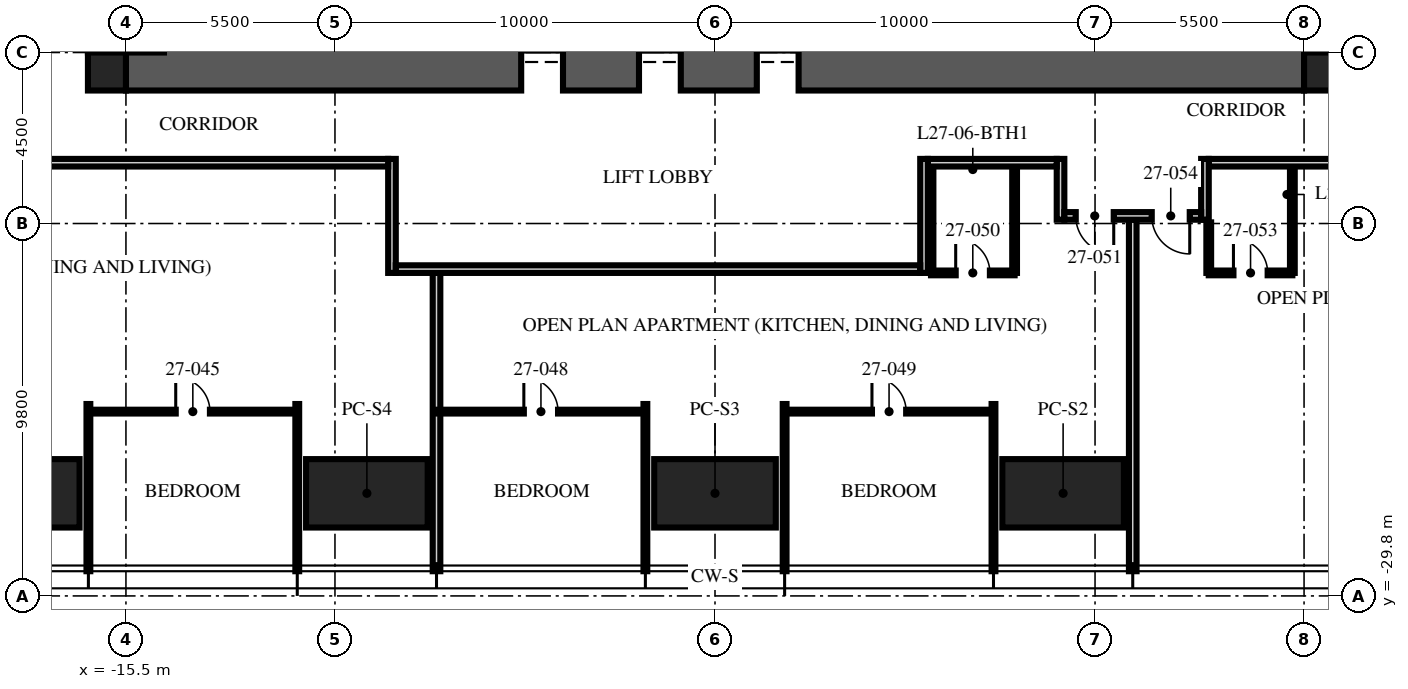
"""IFC4 building model, lengths in metres.
Left out: names, types, materials, properties, quantities, classifications, styles, units other than length and angle.
Written with IfcOpenShell. Run it as: python <this file> out.ifc"""

import sys

from ifc_helpers import new_model, si_unit, direction, frame, frame_2d, origin, origin_2d, place, context, subcontext, project, spatial, rectangle, hollow_rectangle, extrude, element, fill, save


model = new_model("IFC4")
c1 = context("Model", 3, precision=1e-05, world=origin(), true_north=direction((0.0, 1.0)))
c2 = subcontext(c1, "Body", "Model", "MODEL_VIEW")
j1 = project(units=[si_unit("LENGTHUNIT", "METRE"), si_unit("PLANEANGLEUNIT", "RADIAN")], contexts=[c1])
p1 = place(None, origin())
s1 = spatial("IfcSite", under=j1, at=p1, CompositionType="ELEMENT")
p2 = place(p1, origin())
s2 = spatial("IfcBuilding", under=s1, at=p2, CompositionType="ELEMENT")
p3 = place(p2, frame((0.0, 0.0, 111.0)))
s3 = spatial("IfcBuildingStorey", under=s2, at=p3, CompositionType="ELEMENT", Elevation=111.0)
p4 = place(p3, frame((-15.5, -15.5, -0.25), z_axis=(0.0, 0.0, 1.0), x_axis=(1.0, 0.0, 0.0)))
e1 = element("IfcWall", 1, at=p4, inside=s3, PredefinedType="SHEAR", context=c2, shape_type="SweptSolid", body=[
    extrude(rectangle(XDim=31.0, YDim=2.0, at=frame_2d((15.5, 0.0))), origin(), (0.0, 0.0, 1.0), 3.75),
])
p5 = place(p4, frame((10.4, 0.0, 0.25)))
e2 = element("IfcOpeningElement", 2, at=p5, cuts=e1, PredefinedType="OPENING", context=c2, shape_type="SweptSolid", body=[
    extrude(rectangle(XDim=1.1, YDim=2.1, at=frame_2d((0.55, 1.05))), frame((0.0, 1.01, 0.0), z_axis=(0.0, -1.0, 0.0), x_axis=(1.0, 0.0, 0.0)), (0.0, 0.0, 1.0), 2.02),
])
p6 = place(p4, frame((13.5, 0.0, 0.25)))
e3 = element("IfcOpeningElement", 3, at=p6, cuts=e1, PredefinedType="OPENING", context=c2, shape_type="SweptSolid", body=[
    extrude(rectangle(XDim=1.1, YDim=2.1, at=frame_2d((0.55, 1.05))), frame((0.0, 1.01, 0.0), z_axis=(0.0, -1.0, 0.0), x_axis=(1.0, 0.0, 0.0)), (0.0, 0.0, 1.0), 2.02),
])
p7 = place(p4, frame((16.6, 0.0, 0.25)))
e4 = element("IfcOpeningElement", 4, at=p7, cuts=e1, PredefinedType="OPENING", context=c2, shape_type="SweptSolid", body=[
    extrude(rectangle(XDim=1.1, YDim=2.1, at=frame_2d((0.55, 1.05))), frame((0.0, 1.01, 0.0), z_axis=(0.0, -1.0, 0.0), x_axis=(1.0, 0.0, 0.0)), (0.0, 0.0, 1.0), 2.02),
])
for number, where, z_axis, x_axis in (
    (5, (-16.0, -16.0, -0.25), (0.0, 0.0, 1.0), (1.0, 0.0, 0.0)),
    (6, (16.0, -16.0, -0.25), (0.0, 0.0, 1.0), (1.0, 0.0, 0.0)),
):
    element("IfcColumn", number, at=place(p3, frame(where, z_axis=z_axis, x_axis=x_axis)), inside=s3, PredefinedType="COLUMN", context=c2, shape_type="SweptSolid", body=[
        extrude(rectangle(XDim=1.0, YDim=1.0, at=origin_2d()), origin(), (0.0, 0.0, 1.0), 3.75),
    ])
for number, where, z_axis, x_axis in (
    (7, (9.16, -27.1, 0.0), (0.0, 0.0, 1.0), (1.0, 0.0, 0.0)),
    (8, (0.0, -27.1, 0.0), (0.0, 0.0, 1.0), (1.0, 0.0, 0.0)),
    (9, (-9.16, -27.1, 0.0), (0.0, 0.0, 1.0), (1.0, 0.0, 0.0)),
    (10, (-18.32, -27.1, 0.0), (0.0, 0.0, 1.0), (1.0, 0.0, 0.0)),
):
    element("IfcColumn", number, at=place(p3, frame(where, z_axis=z_axis, x_axis=x_axis)), inside=s3, PredefinedType="COLUMN", context=c2, shape_type="SweptSolid", body=[
        extrude(hollow_rectangle(XDim=3.2, YDim=1.8, WallThickness=0.2, at=origin_2d()), origin(), (0.0, 0.0, 1.0), 3.75),
    ])
for number, where, z_axis, x_axis in (
    (11, (-16.488, -24.75, 0.0), (0.0, 0.0, 1.0), (0.0, -1.0, 0.0)),
    (12, (-10.992, -24.75, 0.0), (0.0, 0.0, 1.0), (0.0, -1.0, 0.0)),
):
    element("IfcWall", number, at=place(p3, frame(where, z_axis=z_axis, x_axis=x_axis)), inside=s3, PredefinedType="PARTITIONING", context=c2, shape_type="SweptSolid", body=[
        extrude(rectangle(XDim=4.4, YDim=0.1, at=frame_2d((2.2, 0.0))), origin(), (0.0, 0.0, 1.0), 2.81),
    ])
p8 = place(p3, frame((-7.328, -21.3, 0.0), z_axis=(0.0, 0.0, 1.0), x_axis=(0.0, -1.0, 0.0)))
e13 = element("IfcWall", 13, at=p8, inside=s3, PredefinedType="PARTITIONING", context=c2, shape_type="SweptSolid", body=[
    extrude(rectangle(XDim=7.85, YDim=0.2, at=frame_2d((3.925, 0.0))), origin(), (0.0, 0.0, 1.0), 2.81),
])
for number, where, z_axis, x_axis in (
    (14, (-1.832, -24.75, 0.0), (0.0, 0.0, 1.0), (0.0, -1.0, 0.0)),
    (15, (1.832, -24.75, 0.0), (0.0, 0.0, 1.0), (0.0, -1.0, 0.0)),
    (16, (7.328, -24.75, 0.0), (0.0, 0.0, 1.0), (0.0, -1.0, 0.0)),
):
    element("IfcWall", number, at=place(p3, frame(where, z_axis=z_axis, x_axis=x_axis)), inside=s3, PredefinedType="PARTITIONING", context=c2, shape_type="SweptSolid", body=[
        extrude(rectangle(XDim=4.4, YDim=0.1, at=frame_2d((2.2, 0.0))), origin(), (0.0, 0.0, 1.0), 2.81),
    ])
p9 = place(p3, frame((10.992, -19.9, 0.0), z_axis=(0.0, 0.0, 1.0), x_axis=(0.0, -1.0, 0.0)))
e17 = element("IfcWall", 17, at=p9, inside=s3, PredefinedType="PARTITIONING", context=c2, shape_type="SweptSolid", body=[
    extrude(rectangle(XDim=9.25, YDim=0.2, at=frame_2d((4.625, 0.0))), origin(), (0.0, 0.0, 1.0), 2.81),
])
p10 = place(p3, frame((-16.488, -24.95, 0.0), z_axis=(0.0, 0.0, 1.0), x_axis=(1.0, 0.0, 0.0)))
e18 = element("IfcWall", 18, at=p10, inside=s3, PredefinedType="PARTITIONING", context=c2, shape_type="SweptSolid", body=[
    extrude(rectangle(XDim=5.496, YDim=0.1, at=frame_2d((2.748, 0.0))), origin(), (0.0, 0.0, 1.0), 2.81),
])
p11 = place(p10, frame((2.298, 0.0, 0.0)))
e19 = element("IfcOpeningElement", 19, at=p11, cuts=e18, PredefinedType="OPENING", context=c2, shape_type="SweptSolid", body=[
    extrude(rectangle(XDim=0.9, YDim=2.1, at=frame_2d((0.45, 1.05))), frame((0.0, 0.06, 0.0), z_axis=(0.0, -1.0, 0.0), x_axis=(1.0, 0.0, 0.0)), (0.0, 0.0, 1.0), 0.12),
])
p12 = place(p3, frame((-7.328, -24.95, 0.0), z_axis=(0.0, 0.0, 1.0), x_axis=(1.0, 0.0, 0.0)))
e20 = element("IfcWall", 20, at=p12, inside=s3, PredefinedType="PARTITIONING", context=c2, shape_type="SweptSolid", body=[
    extrude(rectangle(XDim=5.496, YDim=0.1, at=frame_2d((2.748, 0.0))), origin(), (0.0, 0.0, 1.0), 2.81),
])
p13 = place(p12, frame((2.298, 0.0, 0.0)))
e21 = element("IfcOpeningElement", 21, at=p13, cuts=e20, PredefinedType="OPENING", context=c2, shape_type="SweptSolid", body=[
    extrude(rectangle(XDim=0.9, YDim=2.1, at=frame_2d((0.45, 1.05))), frame((0.0, 0.06, 0.0), z_axis=(0.0, -1.0, 0.0), x_axis=(1.0, 0.0, 0.0)), (0.0, 0.0, 1.0), 0.12),
])
p14 = place(p3, frame((1.832, -24.95, 0.0), z_axis=(0.0, 0.0, 1.0), x_axis=(1.0, 0.0, 0.0)))
e22 = element("IfcWall", 22, at=p14, inside=s3, PredefinedType="PARTITIONING", context=c2, shape_type="SweptSolid", body=[
    extrude(rectangle(XDim=5.496, YDim=0.1, at=frame_2d((2.748, 0.0))), origin(), (0.0, 0.0, 1.0), 2.81),
])
p15 = place(p14, frame((2.298, 0.0, 0.0)))
e23 = element("IfcOpeningElement", 23, at=p15, cuts=e22, PredefinedType="OPENING", context=c2, shape_type="SweptSolid", body=[
    extrude(rectangle(XDim=0.9, YDim=2.1, at=frame_2d((0.45, 1.05))), frame((0.0, 0.06, 0.0), z_axis=(0.0, -1.0, 0.0), x_axis=(1.0, 0.0, 0.0)), (0.0, 0.0, 1.0), 0.12),
])
p16 = place(p3, frame((5.684, -21.3, 0.0), z_axis=(0.0, 0.0, 1.0), x_axis=(1.0, 0.0, 0.0)))
e24 = element("IfcWall", 24, at=p16, inside=s3, PredefinedType="PARTITIONING", context=c2, shape_type="SweptSolid", body=[
    extrude(rectangle(XDim=2.2, YDim=0.125, at=frame_2d((1.1, 0.0))), origin(), (0.0, 0.0, 1.0), 3.5),
])
p17 = place(p16, frame((0.65, 0.0, 0.0)))
e25 = element("IfcOpeningElement", 25, at=p17, cuts=e24, PredefinedType="OPENING", context=c2, shape_type="SweptSolid", body=[
    extrude(rectangle(XDim=0.9, YDim=2.1, at=frame_2d((0.45, 1.05))), frame((0.0, 0.073, 0.0), z_axis=(0.0, -1.0, 0.0), x_axis=(1.0, 0.0, 0.0)), (0.0, 0.0, 1.0), 0.145),
])
for number, where, z_axis, x_axis in (
    (26, (5.684, -18.5, 0.0), (0.0, 0.0, 1.0), (0.0, -1.0, 0.0)),
    (27, (7.884, -18.5, 0.0), (0.0, 0.0, 1.0), (0.0, -1.0, 0.0)),
):
    element("IfcWall", number, at=place(p3, frame(where, z_axis=z_axis, x_axis=x_axis)), inside=s3, PredefinedType="PARTITIONING", context=c2, shape_type="SweptSolid", body=[
        extrude(rectangle(XDim=2.8, YDim=0.125, at=frame_2d((1.4, 0.0))), origin(), (0.0, 0.0, 1.0), 3.5),
    ])
p18 = place(p3, frame((12.992, -21.3, 0.0), z_axis=(0.0, 0.0, 1.0), x_axis=(1.0, 0.0, 0.0)))
e28 = element("IfcWall", 28, at=p18, inside=s3, PredefinedType="PARTITIONING", context=c2, shape_type="SweptSolid", body=[
    extrude(rectangle(XDim=2.2, YDim=0.125, at=frame_2d((1.1, 0.0))), origin(), (0.0, 0.0, 1.0), 2.81),
])
p19 = place(p18, frame((0.65, 0.0, 0.0)))
e29 = element("IfcOpeningElement", 29, at=p19, cuts=e28, PredefinedType="OPENING", context=c2, shape_type="SweptSolid", body=[
    extrude(rectangle(XDim=0.9, YDim=2.1, at=frame_2d((0.45, 1.05))), frame((0.0, 0.073, 0.0), z_axis=(0.0, -1.0, 0.0), x_axis=(1.0, 0.0, 0.0)), (0.0, 0.0, 1.0), 0.145),
])
p20 = place(p3, frame((12.992, -19.97, 0.0), z_axis=(0.0, 0.0, 1.0), x_axis=(0.0, -1.0, 0.0)))
e30 = element("IfcWall", 30, at=p20, inside=s3, PredefinedType="PARTITIONING", context=c2, shape_type="SweptSolid", body=[
    extrude(rectangle(XDim=1.33, YDim=0.125, at=frame_2d((0.665, 0.0))), origin(), (0.0, 0.0, 1.0), 3.5),
])
p21 = place(p3, frame((15.192, -18.5, 0.0), z_axis=(0.0, 0.0, 1.0), x_axis=(0.0, -1.0, 0.0)))
e31 = element("IfcWall", 31, at=p21, inside=s3, PredefinedType="PARTITIONING", context=c2, shape_type="SweptSolid", body=[
    extrude(rectangle(XDim=2.8, YDim=0.125, at=frame_2d((1.4, 0.0))), origin(), (0.0, 0.0, 1.0), 3.5),
])
p22 = place(p3, frame((18.5, -18.4, 0.0), z_axis=(0.0, 0.0, 1.0), x_axis=(-1.0, 0.0, 0.0)))
e32 = element("IfcWall", 32, at=p22, inside=s3, PredefinedType="PARTITIONING", context=c2, shape_type="SweptSolid", body=[
    extrude(rectangle(XDim=5.508, YDim=0.2, at=frame_2d((2.754, 0.0))), origin(), (0.0, 0.0, 1.0), 2.3),
])
p23 = place(p3, frame((12.892, -18.3, 0.0), z_axis=(0.0, 0.0, 1.0), x_axis=(0.0, -1.0, 0.0)))
e33 = element("IfcWall", 33, at=p23, inside=s3, PredefinedType="PARTITIONING", context=c2, shape_type="SweptSolid", body=[
    extrude(rectangle(XDim=1.6, YDim=0.2, at=frame_2d((0.8, 0.0))), origin(), (0.0, 0.0, 1.0), 3.5),
])
p24 = place(p3, frame((9.092, -18.3, 0.0), z_axis=(0.0, 0.0, 1.0), x_axis=(0.0, -1.0, 0.0)))
e34 = element("IfcWall", 34, at=p24, inside=s3, PredefinedType="PARTITIONING", context=c2, shape_type="SweptSolid", body=[
    extrude(rectangle(XDim=1.6, YDim=0.2, at=frame_2d((0.8, 0.0))), origin(), (0.0, 0.0, 1.0), 2.7),
])
p25 = place(p3, frame((12.792, -19.8, 0.0), z_axis=(0.0, 0.0, 1.0), x_axis=(-1.0, 0.0, 0.0)))
e35 = element("IfcWall", 35, at=p25, inside=s3, PredefinedType="PARTITIONING", context=c2, shape_type="SweptSolid", body=[
    extrude(rectangle(XDim=3.6, YDim=0.2, at=frame_2d((1.8, 0.0))), origin(), (0.0, 0.0, 1.0), 2.7),
])
p26 = place(p25, frame((2.3, 0.0, 0.0)))
e36 = element("IfcOpeningElement", 36, at=p26, cuts=e35, PredefinedType="OPENING", context=c2, shape_type="SweptSolid", body=[
    extrude(rectangle(XDim=1.0, YDim=2.2, at=frame_2d((0.5, 1.1))), frame((0.0, 0.11, 0.0), z_axis=(0.0, -1.0, 0.0), x_axis=(1.0, 0.0, 0.0)), (0.0, 0.0, 1.0), 0.22),
])
p27 = place(p25, frame((0.3, 0.0, 0.0)))
e37 = element("IfcOpeningElement", 37, at=p27, cuts=e35, PredefinedType="OPENING", context=c2, shape_type="SweptSolid", body=[
    extrude(rectangle(XDim=1.0, YDim=2.2, at=frame_2d((0.5, 1.1))), frame((0.0, 0.11, 0.0), z_axis=(0.0, -1.0, 0.0), x_axis=(1.0, 0.0, 0.0)), (0.0, 0.0, 1.0), 0.22),
])
p28 = place(p3, frame((8.992, -18.4, 0.0), z_axis=(0.0, 0.0, 1.0), x_axis=(-1.0, 0.0, 0.0)))
e38 = element("IfcWall", 38, at=p28, inside=s3, PredefinedType="PARTITIONING", context=c2, shape_type="SweptSolid", body=[
    extrude(rectangle(XDim=3.392, YDim=0.2, at=frame_2d((1.696, 0.0))), origin(), (0.0, 0.0, 1.0), 3.5),
])
for number, where, z_axis, x_axis in (
    (39, (5.5, -18.3, 0.0), (0.0, 0.0, 1.0), (0.0, -1.0, 0.0)),
    (40, (-8.5, -18.3, 0.0), (0.0, 0.0, 1.0), (0.0, -1.0, 0.0)),
):
    element("IfcWall", number, at=place(p3, frame(where, z_axis=z_axis, x_axis=x_axis)), inside=s3, PredefinedType="PARTITIONING", context=c2, shape_type="SweptSolid", body=[
        extrude(rectangle(XDim=3.0, YDim=0.2, at=frame_2d((1.5, 0.0))), origin(), (0.0, 0.0, 1.0), 3.5),
    ])
p29 = place(p3, frame((5.4, -21.2, 0.0), z_axis=(0.0, 0.0, 1.0), x_axis=(-1.0, 0.0, 0.0)))
e41 = element("IfcWall", 41, at=p29, inside=s3, PredefinedType="PARTITIONING", context=c2, shape_type="SweptSolid", body=[
    extrude(rectangle(XDim=13.8, YDim=0.2, at=frame_2d((6.9, 0.0))), origin(), (0.0, 0.0, 1.0), 2.7),
])
p30 = place(p3, frame((-8.6, -18.4, 0.0), z_axis=(0.0, 0.0, 1.0), x_axis=(-1.0, 0.0, 0.0)))
e42 = element("IfcWall", 42, at=p30, inside=s3, PredefinedType="PARTITIONING", context=c2, shape_type="SweptSolid", body=[
    extrude(rectangle(XDim=9.9, YDim=0.2, at=frame_2d((4.95, 0.0))), origin(), (0.0, 0.0, 1.0), 2.3),
])
p31 = place(p5, origin())
e43 = element("IfcDoor", 43, at=p31, inside=s3, OperationType="DOUBLE_DOOR_SLIDING", PredefinedType="DOOR", context=c2, shape_type="SweptSolid", body=[
    extrude(rectangle(XDim=1.1, YDim=2.1, at=frame_2d((0.55, 1.05))), frame((0.0, 0.025, 0.0), z_axis=(0.0, -1.0, 0.0), x_axis=(1.0, 0.0, 0.0)), (0.0, 0.0, 1.0), 0.05),
])
fill(e2, e43)
p32 = place(p6, origin())
e44 = element("IfcDoor", 44, at=p32, inside=s3, OperationType="DOUBLE_DOOR_SLIDING", PredefinedType="DOOR", context=c2, shape_type="SweptSolid", body=[
    extrude(rectangle(XDim=1.1, YDim=2.1, at=frame_2d((0.55, 1.05))), frame((0.0, 0.025, 0.0), z_axis=(0.0, -1.0, 0.0), x_axis=(1.0, 0.0, 0.0)), (0.0, 0.0, 1.0), 0.05),
])
fill(e3, e44)
p33 = place(p7, origin())
e45 = element("IfcDoor", 45, at=p33, inside=s3, OperationType="DOUBLE_DOOR_SLIDING", PredefinedType="DOOR", context=c2, shape_type="SweptSolid", body=[
    extrude(rectangle(XDim=1.1, YDim=2.1, at=frame_2d((0.55, 1.05))), frame((0.0, 0.025, 0.0), z_axis=(0.0, -1.0, 0.0), x_axis=(1.0, 0.0, 0.0)), (0.0, 0.0, 1.0), 0.05),
])
fill(e4, e45)
p34 = place(p11, origin())
e46 = element("IfcDoor", 46, at=p34, inside=s3, OperationType="SINGLE_SWING_LEFT", PredefinedType="DOOR", context=c2, shape_type="SweptSolid", body=[
    extrude(rectangle(XDim=0.9, YDim=2.1, at=frame_2d((0.45, 1.05))), frame((0.0, 0.025, 0.0), z_axis=(0.0, -1.0, 0.0), x_axis=(1.0, 0.0, 0.0)), (0.0, 0.0, 1.0), 0.05),
])
fill(e19, e46)
p35 = place(p13, origin())
e47 = element("IfcDoor", 47, at=p35, inside=s3, OperationType="SINGLE_SWING_LEFT", PredefinedType="DOOR", context=c2, shape_type="SweptSolid", body=[
    extrude(rectangle(XDim=0.9, YDim=2.1, at=frame_2d((0.45, 1.05))), frame((0.0, 0.025, 0.0), z_axis=(0.0, -1.0, 0.0), x_axis=(1.0, 0.0, 0.0)), (0.0, 0.0, 1.0), 0.05),
])
fill(e21, e47)
p36 = place(p15, origin())
e48 = element("IfcDoor", 48, at=p36, inside=s3, OperationType="SINGLE_SWING_LEFT", PredefinedType="DOOR", context=c2, shape_type="SweptSolid", body=[
    extrude(rectangle(XDim=0.9, YDim=2.1, at=frame_2d((0.45, 1.05))), frame((0.0, 0.025, 0.0), z_axis=(0.0, -1.0, 0.0), x_axis=(1.0, 0.0, 0.0)), (0.0, 0.0, 1.0), 0.05),
])
fill(e23, e48)
p37 = place(p17, origin())
e49 = element("IfcDoor", 49, at=p37, inside=s3, OperationType="SINGLE_SWING_LEFT", PredefinedType="DOOR", context=c2, shape_type="SweptSolid", body=[
    extrude(rectangle(XDim=0.9, YDim=2.1, at=frame_2d((0.45, 1.05))), frame((0.0, 0.025, 0.0), z_axis=(0.0, -1.0, 0.0), x_axis=(1.0, 0.0, 0.0)), (0.0, 0.0, 1.0), 0.05),
])
fill(e25, e49)
p38 = place(p26, origin())
e50 = element("IfcDoor", 50, at=p38, inside=s3, OperationType="SINGLE_SWING_LEFT", PredefinedType="DOOR", context=c2, shape_type="SweptSolid", body=[
    extrude(rectangle(XDim=1.0, YDim=2.2, at=frame_2d((0.5, 1.1))), frame((0.0, 0.025, 0.0), z_axis=(0.0, -1.0, 0.0), x_axis=(1.0, 0.0, 0.0)), (0.0, 0.0, 1.0), 0.05),
])
fill(e36, e50)
p39 = place(p19, origin())
e51 = element("IfcDoor", 51, at=p39, inside=s3, OperationType="SINGLE_SWING_LEFT", PredefinedType="DOOR", context=c2, shape_type="SweptSolid", body=[
    extrude(rectangle(XDim=0.9, YDim=2.1, at=frame_2d((0.45, 1.05))), frame((0.0, 0.025, 0.0), z_axis=(0.0, -1.0, 0.0), x_axis=(1.0, 0.0, 0.0)), (0.0, 0.0, 1.0), 0.05),
])
fill(e29, e51)
p40 = place(p27, origin())
e52 = element("IfcDoor", 52, at=p40, inside=s3, OperationType="SINGLE_SWING_LEFT", PredefinedType="DOOR", context=c2, shape_type="SweptSolid", body=[
    extrude(rectangle(XDim=1.0, YDim=2.2, at=frame_2d((0.5, 1.1))), frame((0.0, 0.025, 0.0), z_axis=(0.0, -1.0, 0.0), x_axis=(1.0, 0.0, 0.0)), (0.0, 0.0, 1.0), 0.05),
])
fill(e37, e52)
save(model, sys.argv[1])
